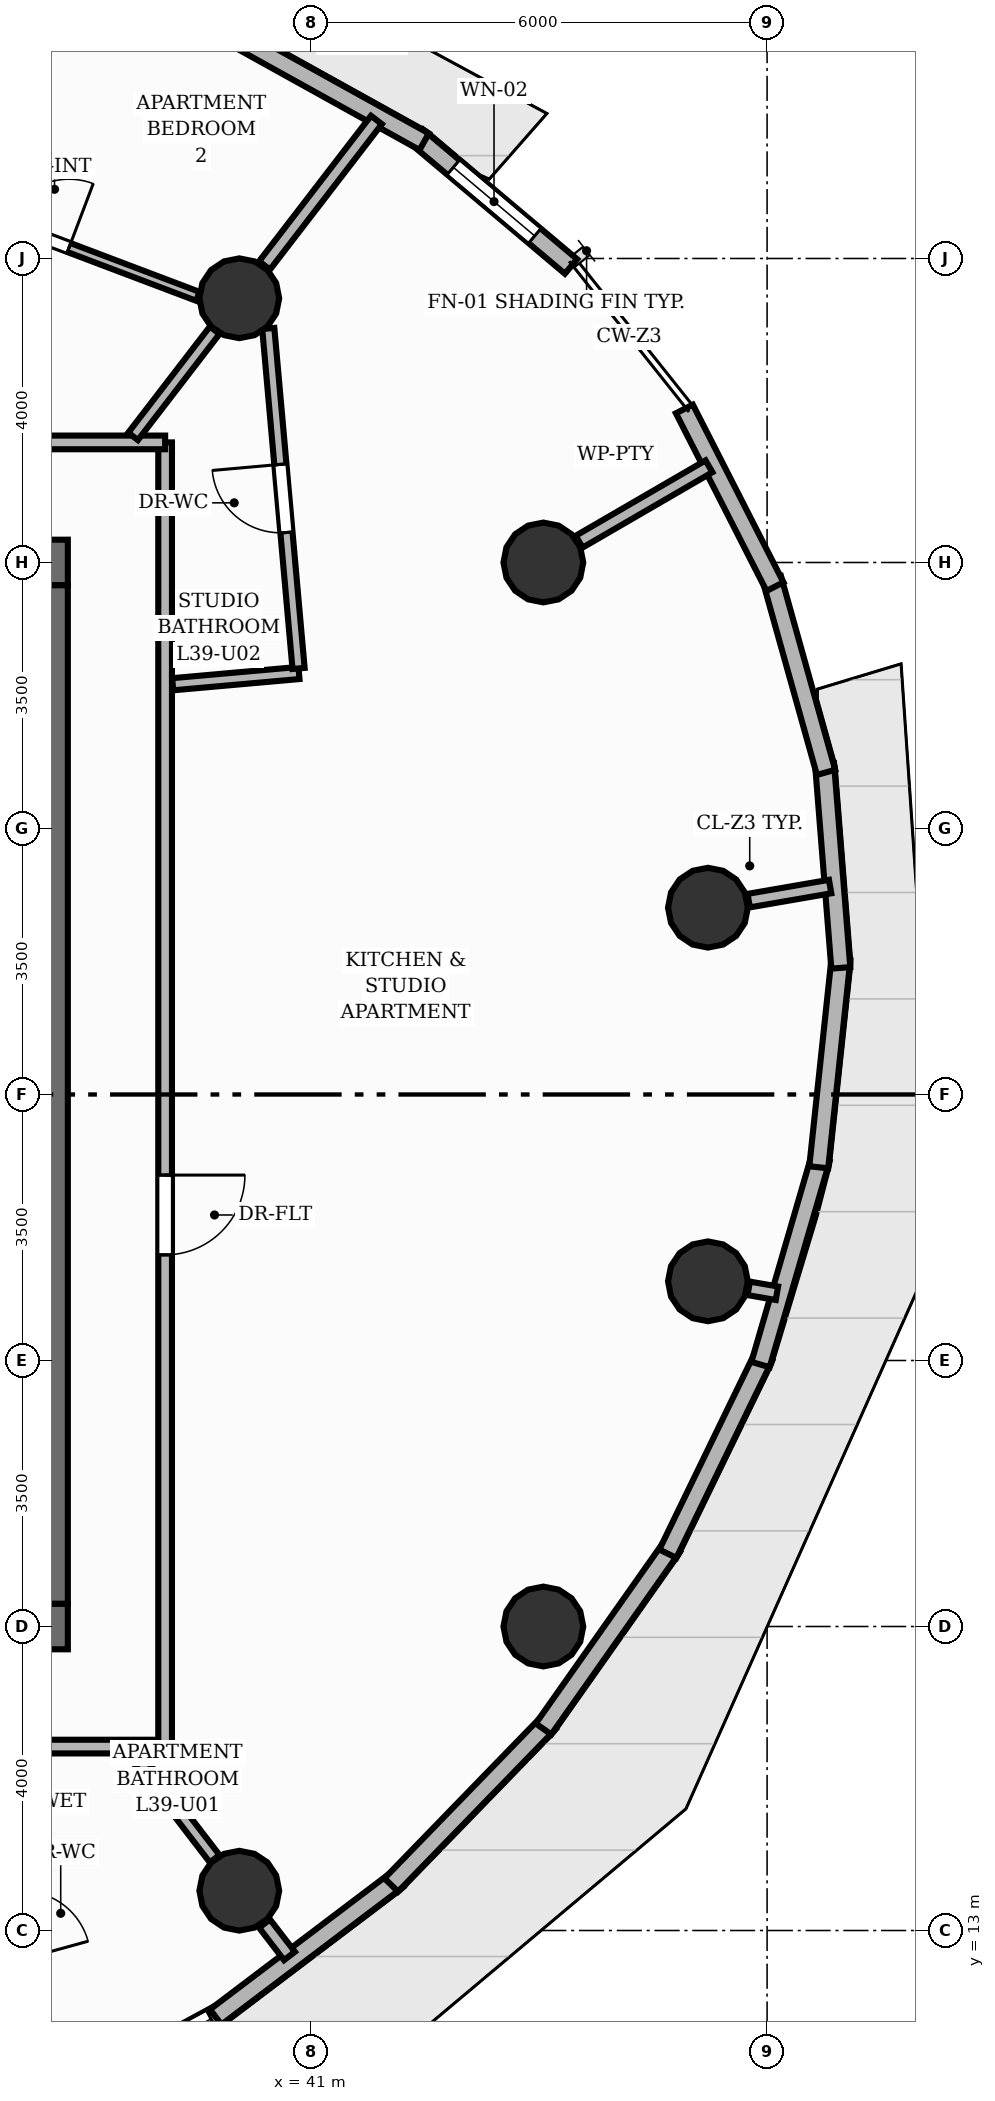
"""IFC4 building model, lengths in metres.
Left out: names, types, materials, properties, quantities, classifications, styles, units other than length and angle.
Written with IfcOpenShell. Run it as: python <this file> out.ifc"""

import sys

from ifc_helpers import new_model, si_unit, direction, frame, frame_2d, origin, origin_2d, place, context, subcontext, project, spatial, rectangle, circle, extrude, element, fill, save


model = new_model("IFC4")
c1 = context("Model", 3, precision=1e-05, world=origin(), true_north=direction((0.0, 1.0)))
c2 = subcontext(c1, "Body", "Model", "MODEL_VIEW")
j1 = project(units=[si_unit("LENGTHUNIT", "METRE"), si_unit("PLANEANGLEUNIT", "RADIAN")], contexts=[c1])
p1 = place(None, origin())
s1 = spatial("IfcSite", under=j1, at=p1, CompositionType="ELEMENT")
p2 = place(p1, origin())
s2 = spatial("IfcBuilding", under=s1, at=p2, CompositionType="ELEMENT")
p3 = place(p2, frame((0.0, 0.0, 132.96)))
s3 = spatial("IfcBuildingStorey", under=s2, at=p3, CompositionType="ELEMENT", Elevation=132.96)
p4 = place(p3, frame((22.7, 17.0, 0.0), z_axis=(0.0, 0.0, 1.0), x_axis=(1.0, 0.0, 0.0)))
e1 = element("IfcWall", 1, at=p4, inside=s3, PredefinedType="SHEAR", context=c2, shape_type="SweptSolid", body=[
    extrude(rectangle(XDim=15.1, YDim=0.6, at=frame_2d((7.55, 0.0))), origin(), (0.0, 0.0, 1.0), 3.2),
])
p5 = place(p4, frame((5.8, 0.0, 0.0)))
e2 = element("IfcOpeningElement", 2, at=p5, cuts=e1, PredefinedType="OPENING", context=c2, shape_type="SweptSolid", body=[
    extrude(rectangle(XDim=1.1, YDim=2.15, at=frame_2d((0.55, 1.075))), frame((0.0, 0.31, 0.0), z_axis=(0.0, -1.0, 0.0), x_axis=(1.0, 0.0, 0.0)), (0.0, 0.0, 1.0), 0.62),
])
p6 = place(p4, frame((9.35, 0.0, 0.0)))
e3 = element("IfcOpeningElement", 3, at=p6, cuts=e1, PredefinedType="OPENING", context=c2, shape_type="SweptSolid", body=[
    extrude(rectangle(XDim=0.9, YDim=2.1, at=frame_2d((0.45, 1.05))), frame((0.0, 0.31, 0.0), z_axis=(0.0, -1.0, 0.0), x_axis=(1.0, 0.0, 0.0)), (0.0, 0.0, 1.0), 0.62),
])
p7 = place(p3, frame((22.7, 31.0, 0.0), z_axis=(0.0, 0.0, 1.0), x_axis=(1.0, 0.0, 0.0)))
e4 = element("IfcWall", 4, at=p7, inside=s3, PredefinedType="SHEAR", context=c2, shape_type="SweptSolid", body=[
    extrude(rectangle(XDim=15.1, YDim=0.6, at=frame_2d((7.55, 0.0))), origin(), (0.0, 0.0, 1.0), 3.2),
])
p8 = place(p7, frame((11.7, 0.0, 0.0)))
e5 = element("IfcOpeningElement", 5, at=p8, cuts=e4, PredefinedType="OPENING", context=c2, shape_type="SweptSolid", body=[
    extrude(rectangle(XDim=1.1, YDim=2.15, at=frame_2d((0.55, 1.075))), frame((0.0, 0.31, 0.0), z_axis=(0.0, -1.0, 0.0), x_axis=(1.0, 0.0, 0.0)), (0.0, 0.0, 1.0), 0.62),
])
p9 = place(p3, frame((37.5, 17.3, 0.0), z_axis=(0.0, 0.0, 1.0), x_axis=(0.0, 1.0, 0.0)))
e6 = element("IfcWall", 6, at=p9, inside=s3, PredefinedType="SHEAR", context=c2, shape_type="SweptSolid", body=[
    extrude(rectangle(XDim=13.4, YDim=0.6, at=frame_2d((6.7, 0.0))), origin(), (0.0, 0.0, 1.0), 3.2),
])
for number, where, z_axis, x_axis in (
    (7, (46.221, 26.458, 0.0), (0.0, 0.0, 1.0), (1.0, 0.0, 0.0)),
    (8, (44.056, 31.0, 0.0), (0.0, 0.0, 1.0), (1.0, 0.0, 0.0)),
    (9, (40.056, 34.477, 0.0), (0.0, 0.0, 1.0), (1.0, 0.0, 0.0)),
    (10, (40.056, 13.523, 0.0), (0.0, 0.0, 1.0), (1.0, 0.0, 0.0)),
    (11, (44.056, 17.0, 0.0), (0.0, 0.0, 1.0), (1.0, 0.0, 0.0)),
    (12, (46.221, 21.542, 0.0), (0.0, 0.0, 1.0), (1.0, 0.0, 0.0)),
):
    element("IfcColumn", number, at=place(p3, frame(where, z_axis=z_axis, x_axis=x_axis)), inside=s3, PredefinedType="COLUMN", context=c2, shape_type="SweptSolid", body=[
        extrude(circle(Radius=0.525, at=origin_2d()), origin(), (0.0, 0.0, 1.0), 3.2),
    ])
p10 = place(p3, frame((42.395, 36.601, 0.0), z_axis=(0.0, 0.0, 1.0), x_axis=(0.764825125467, -0.644237943197, 0.0)))
e13 = element("IfcWall", 13, at=p10, inside=s3, PredefinedType="SOLIDWALL", context=c2, shape_type="SweptSolid", body=[
    extrude(rectangle(XDim=2.648, YDim=0.25, at=frame_2d((1.324, 0.0))), origin(), (0.0, 0.0, 1.0), 2.96),
])
p11 = place(p10, frame((0.624, 0.0, 0.85)))
e14 = element("IfcOpeningElement", 14, at=p11, cuts=e13, PredefinedType="OPENING", context=c2, shape_type="SweptSolid", body=[
    extrude(rectangle(XDim=1.4, YDim=1.55, at=frame_2d((0.7, 0.775))), frame((0.0, 0.135, 0.0), z_axis=(0.0, -1.0, 0.0), x_axis=(1.0, 0.0, 0.0)), (0.0, 0.0, 1.0), 0.27),
])
p12 = place(p3, frame((40.134, 37.844, 0.0), z_axis=(0.0, 0.0, 1.0), x_axis=(0.874341102682, -0.485311895755, 0.0)))
e15 = element("IfcWall", 15, at=p12, inside=s3, PredefinedType="SOLIDWALL", context=c2, shape_type="SweptSolid", body=[
    extrude(rectangle(XDim=2.693, YDim=0.25, at=frame_2d((1.346, 0.0))), origin(), (0.0, 0.0, 1.0), 2.96),
])
p13 = place(p3, frame((39.837, 11.921, 0.0), z_axis=(0.0, 0.0, 1.0), x_axis=(-0.879567466611, -0.475774181393, 0.0)))
e16 = element("IfcWall", 16, at=p13, inside=s3, PredefinedType="SOLIDWALL", context=c2, shape_type="SweptSolid", body=[
    extrude(rectangle(XDim=2.998, YDim=0.25, at=frame_2d((1.499, 0.0))), origin(), (0.0, 0.0, 1.0), 2.96),
])
p14 = place(p13, frame((0.175, 0.0, 0.85)))
e17 = element("IfcOpeningElement", 17, at=p14, cuts=e16, PredefinedType="OPENING", context=c2, shape_type="SweptSolid", body=[
    extrude(rectangle(XDim=1.65, YDim=1.55, at=frame_2d((0.825, 0.775))), frame((0.0, 0.135, 0.0), z_axis=(0.0, -1.0, 0.0), x_axis=(1.0, 0.0, 0.0)), (0.0, 0.0, 1.0), 0.27),
])
p15 = place(p3, frame((42.137, 13.671, 0.0), z_axis=(0.0, 0.0, 1.0), x_axis=(-0.797511213298, -0.603304122863, 0.0)))
e18 = element("IfcWall", 18, at=p15, inside=s3, PredefinedType="SOLIDWALL", context=c2, shape_type="SweptSolid", body=[
    extrude(rectangle(XDim=2.998, YDim=0.25, at=frame_2d((1.499, 0.0))), origin(), (0.0, 0.0, 1.0), 2.96),
])
p16 = place(p3, frame((44.128, 15.736, 0.0), z_axis=(0.0, 0.0, 1.0), x_axis=(-0.696240605886, -0.717808483312, 0.0)))
e19 = element("IfcWall", 19, at=p16, inside=s3, PredefinedType="SOLIDWALL", context=c2, shape_type="SweptSolid", body=[
    extrude(rectangle(XDim=2.977, YDim=0.25, at=frame_2d((1.489, 0.0))), origin(), (0.0, 0.0, 1.0), 2.96),
])
p17 = place(p3, frame((45.75, 18.052, 0.0), z_axis=(0.0, 0.0, 1.0), x_axis=(-0.576020449187, -0.817435283137, 0.0)))
e20 = element("IfcWall", 20, at=p17, inside=s3, PredefinedType="SOLIDWALL", context=c2, shape_type="SweptSolid", body=[
    extrude(rectangle(XDim=2.937, YDim=0.25, at=frame_2d((1.468, 0.0))), origin(), (0.0, 0.0, 1.0), 2.96),
])
p18 = place(p3, frame((46.953, 20.55, 0.0), z_axis=(0.0, 0.0, 1.0), x_axis=(-0.436882419805, -0.899518621967, 0.0)))
e21 = element("IfcWall", 21, at=p18, inside=s3, PredefinedType="SOLIDWALL", context=c2, shape_type="SweptSolid", body=[
    extrude(rectangle(XDim=2.882, YDim=0.25, at=frame_2d((1.441, 0.0))), origin(), (0.0, 0.0, 1.0), 2.96),
])
p19 = place(p3, frame((47.701, 23.152, 0.0), z_axis=(0.0, 0.0, 1.0), x_axis=(-0.27958078407, -0.960122172007, 0.0)))
e22 = element("IfcWall", 22, at=p19, inside=s3, PredefinedType="SOLIDWALL", context=c2, shape_type="SweptSolid", body=[
    extrude(rectangle(XDim=2.818, YDim=0.25, at=frame_2d((1.409, 0.0))), origin(), (0.0, 0.0, 1.0), 2.96),
])
p20 = place(p3, frame((47.971, 25.779, 0.0), z_axis=(0.0, 0.0, 1.0), x_axis=(-0.106010014212, -0.994365062181, 0.0)))
e23 = element("IfcWall", 23, at=p20, inside=s3, PredefinedType="SOLIDWALL", context=c2, shape_type="SweptSolid", body=[
    extrude(rectangle(XDim=2.752, YDim=0.25, at=frame_2d((1.376, 0.0))), origin(), (0.0, 0.0, 1.0), 2.96),
])
p21 = place(p3, frame((47.756, 28.35, 0.0), z_axis=(0.0, 0.0, 1.0), x_axis=(0.079420906371, -0.996841170714, 0.0)))
e24 = element("IfcWall", 24, at=p21, inside=s3, PredefinedType="SOLIDWALL", context=c2, shape_type="SweptSolid", body=[
    extrude(rectangle(XDim=2.693, YDim=0.25, at=frame_2d((1.346, 0.0))), origin(), (0.0, 0.0, 1.0), 2.96),
])
p22 = place(p3, frame((47.062, 30.789, 0.0), z_axis=(0.0, 0.0, 1.0), x_axis=(0.269469206067, -0.963009006698, 0.0)))
e25 = element("IfcWall", 25, at=p22, inside=s3, PredefinedType="SOLIDWALL", context=c2, shape_type="SweptSolid", body=[
    extrude(rectangle(XDim=2.648, YDim=0.25, at=frame_2d((1.324, 0.0))), origin(), (0.0, 0.0, 1.0), 2.96),
])
p23 = place(p3, frame((45.912, 33.02, 0.0), z_axis=(0.0, 0.0, 1.0), x_axis=(0.454196134835, -0.890901717981, 0.0)))
e26 = element("IfcWall", 26, at=p23, inside=s3, PredefinedType="SOLIDWALL", context=c2, shape_type="SweptSolid", body=[
    extrude(rectangle(XDim=2.624, YDim=0.25, at=frame_2d((1.312, 0.0))), origin(), (0.0, 0.0, 1.0), 2.96),
])
p24 = place(p3, frame((46.758, 26.551, 0.0), z_axis=(0.0, 0.0, 1.0), x_axis=(0.985361391556, 0.170478526599, 0.0)))
e27 = element("IfcWall", 27, at=p24, inside=s3, PredefinedType="PARTITIONING", context=c2, shape_type="SweptSolid", body=[
    extrude(rectangle(XDim=1.087, YDim=0.18, at=frame_2d((0.543, 0.0))), origin(), (0.0, 0.0, 1.0), 2.336),
])
p25 = place(p3, frame((44.528, 31.274, 0.0), z_axis=(0.0, 0.0, 1.0), x_axis=(0.864844369658, 0.502040054448, 0.0)))
e28 = element("IfcWall", 28, at=p25, inside=s3, PredefinedType="PARTITIONING", context=c2, shape_type="SweptSolid", body=[
    extrude(rectangle(XDim=1.974, YDim=0.18, at=frame_2d((0.987, 0.0))), origin(), (0.0, 0.0, 1.0), 2.336),
])
p26 = place(p3, frame((40.388, 34.908, 0.0), z_axis=(0.0, 0.0, 1.0), x_axis=(0.609549509747, 0.79274800231, 0.0)))
e29 = element("IfcWall", 29, at=p26, inside=s3, PredefinedType="PARTITIONING", context=c2, shape_type="SweptSolid", body=[
    extrude(rectangle(XDim=2.415, YDim=0.18, at=frame_2d((1.208, 0.0))), origin(), (0.0, 0.0, 1.0), 2.336),
])
p27 = place(p3, frame((40.388, 13.092, 0.0), z_axis=(0.0, 0.0, 1.0), x_axis=(0.609469486836, -0.792809526063, 0.0)))
e30 = element("IfcWall", 30, at=p27, inside=s3, PredefinedType="PARTITIONING", context=c2, shape_type="SweptSolid", body=[
    extrude(rectangle(XDim=0.538, YDim=0.18, at=frame_2d((0.269, 0.0))), origin(), (0.0, 0.0, 1.0), 2.336),
])
p28 = place(p3, frame((46.758, 21.449, 0.0), z_axis=(0.0, 0.0, 1.0), x_axis=(0.98535888436, -0.170493017491, 0.0)))
e31 = element("IfcWall", 31, at=p28, inside=s3, PredefinedType="PARTITIONING", context=c2, shape_type="SweptSolid", body=[
    extrude(rectangle(XDim=0.377, YDim=0.18, at=frame_2d((0.188, 0.0))), origin(), (0.0, 0.0, 1.0), 2.336),
])
p29 = place(p3, frame((39.08, 15.42, 0.0), z_axis=(0.0, 0.0, 1.0), x_axis=(-1.0, 0.0, 0.0)))
e32 = element("IfcWall", 32, at=p29, inside=s3, PredefinedType="PARTITIONING", context=c2, shape_type="SweptSolid", body=[
    extrude(rectangle(XDim=16.39, YDim=0.18, at=frame_2d((8.195, 0.0))), origin(), (0.0, 0.0, 1.0), 2.955),
])
p30 = place(p29, frame((4.593, 0.0, 0.0)))
e33 = element("IfcOpeningElement", 33, at=p30, cuts=e32, PredefinedType="OPENING", context=c2, shape_type="SweptSolid", body=[
    extrude(rectangle(XDim=1.05, YDim=2.15, at=frame_2d((0.525, 1.075))), frame((0.0, 0.1, 0.0), z_axis=(0.0, -1.0, 0.0), x_axis=(1.0, 0.0, 0.0)), (0.0, 0.0, 1.0), 0.2),
])
p31 = place(p3, frame((39.08, 32.58, 0.0), z_axis=(0.0, 0.0, 1.0), x_axis=(0.0, -1.0, 0.0)))
e34 = element("IfcWall", 34, at=p31, inside=s3, PredefinedType="PARTITIONING", context=c2, shape_type="SweptSolid", body=[
    extrude(rectangle(XDim=17.16, YDim=0.18, at=frame_2d((8.58, 0.0))), origin(), (0.0, 0.0, 1.0), 2.955),
])
p32 = place(p31, frame((9.64, 0.0, 0.0)))
e35 = element("IfcOpeningElement", 35, at=p32, cuts=e34, PredefinedType="OPENING", context=c2, shape_type="SweptSolid", body=[
    extrude(rectangle(XDim=1.05, YDim=2.15, at=frame_2d((0.525, 1.075))), frame((0.0, 0.1, 0.0), z_axis=(0.0, -1.0, 0.0), x_axis=(1.0, 0.0, 0.0)), (0.0, 0.0, 1.0), 0.2),
])
p33 = place(p3, frame((32.485, 32.58, 0.0), z_axis=(0.0, 0.0, 1.0), x_axis=(1.0, 0.0, 0.0)))
e36 = element("IfcWall", 36, at=p33, inside=s3, PredefinedType="PARTITIONING", context=c2, shape_type="SweptSolid", body=[
    extrude(rectangle(XDim=6.595, YDim=0.18, at=frame_2d((3.298, 0.0))), origin(), (0.0, 0.0, 1.0), 2.955),
])
p34 = place(p3, frame((36.455, 15.323, 0.0), z_axis=(0.0, 0.0, 1.0), x_axis=(0.265393905211, -0.964140070258, 0.0)))
e37 = element("IfcWall", 37, at=p34, inside=s3, PredefinedType="PLUMBINGWALL", context=c2, shape_type="SweptSolid", body=[
    extrude(rectangle(XDim=4.708, YDim=0.16, at=frame_2d((2.354, 0.0))), origin(), (0.0, 0.0, 1.0), 2.955),
])
p35 = place(p34, frame((1.904, 0.0, 0.0)))
e38 = element("IfcOpeningElement", 38, at=p35, cuts=e37, PredefinedType="OPENING", context=c2, shape_type="SweptSolid", body=[
    extrude(rectangle(XDim=0.9, YDim=2.1, at=frame_2d((0.45, 1.05))), frame((0.0, 0.09, 0.0), z_axis=(0.0, -1.0, 0.0), x_axis=(1.0, 0.0, 0.0)), (0.0, 0.0, 1.0), 0.18),
])
p36 = place(p3, frame((38.658, 15.341, 0.0), z_axis=(0.0, 0.0, 1.0), x_axis=(0.609536601946, -0.792757927042, 0.0)))
e39 = element("IfcWall", 39, at=p36, inside=s3, PredefinedType="PLUMBINGWALL", context=c2, shape_type="SweptSolid", body=[
    extrude(rectangle(XDim=1.761, YDim=0.16, at=frame_2d((0.881, 0.0))), origin(), (0.0, 0.0, 1.0), 2.336),
])
p37 = place(p3, frame((39.18, 29.398, 0.0), z_axis=(0.0, 0.0, 1.0), x_axis=(0.996058284503, 0.088701149215, 0.0)))
e40 = element("IfcWall", 40, at=p37, inside=s3, PredefinedType="PLUMBINGWALL", context=c2, shape_type="SweptSolid", body=[
    extrude(rectangle(XDim=1.668, YDim=0.16, at=frame_2d((0.834, 0.0))), origin(), (0.0, 0.0, 1.0), 2.955),
])
p38 = place(p3, frame((40.836, 29.606, 0.0), z_axis=(0.0, 0.0, 1.0), x_axis=(-0.08877110741, 0.996052052098, 0.0)))
e41 = element("IfcWall", 41, at=p38, inside=s3, PredefinedType="PLUMBINGWALL", context=c2, shape_type="SweptSolid", body=[
    extrude(rectangle(XDim=4.491, YDim=0.16, at=frame_2d((2.246, 0.0))), origin(), (0.0, 0.0, 1.0), 2.955),
])
p39 = place(p38, frame((1.796, 0.0, 0.0)))
e42 = element("IfcOpeningElement", 42, at=p39, cuts=e41, PredefinedType="OPENING", context=c2, shape_type="SweptSolid", body=[
    extrude(rectangle(XDim=0.9, YDim=2.1, at=frame_2d((0.45, 1.05))), frame((0.0, 0.09, 0.0), z_axis=(0.0, -1.0, 0.0), x_axis=(1.0, 0.0, 0.0)), (0.0, 0.0, 1.0), 0.18),
])
p40 = place(p3, frame((38.658, 32.659, 0.0), z_axis=(0.0, 0.0, 1.0), x_axis=(0.609536601946, 0.792757927042, 0.0)))
e43 = element("IfcWall", 43, at=p40, inside=s3, PredefinedType="PLUMBINGWALL", context=c2, shape_type="SweptSolid", body=[
    extrude(rectangle(XDim=1.761, YDim=0.16, at=frame_2d((0.881, 0.0))), origin(), (0.0, 0.0, 1.0), 2.336),
])
p41 = place(p3, frame((35.278, 36.103, 0.0), z_axis=(0.0, 0.0, 1.0), x_axis=(0.935309901838, -0.353829602385, 0.0)))
e44 = element("IfcWall", 44, at=p41, inside=s3, PredefinedType="PARTITIONING", context=c2, shape_type="SweptSolid", body=[
    extrude(rectangle(XDim=4.526, YDim=0.125, at=frame_2d((2.263, 0.0))), origin(), (0.0, 0.0, 1.0), 2.411),
])
p42 = place(p41, frame((1.813, 0.0, 0.0)))
e45 = element("IfcOpeningElement", 45, at=p42, cuts=e44, PredefinedType="OPENING", context=c2, shape_type="SweptSolid", body=[
    extrude(rectangle(XDim=0.9, YDim=2.1, at=frame_2d((0.45, 1.05))), frame((0.0, 0.073, 0.0), z_axis=(0.0, -1.0, 0.0), x_axis=(1.0, 0.0, 0.0)), (0.0, 0.0, 1.0), 0.145),
])
p43 = place(p11, origin())
e46 = element("IfcWindow", 46, at=p43, inside=s3, PartitioningType="SINGLE_PANEL", PredefinedType="WINDOW", context=c2, shape_type="SweptSolid", body=[
    extrude(rectangle(XDim=1.4, YDim=1.55, at=frame_2d((0.7, 0.775))), frame((0.0, 0.03, 0.0), z_axis=(0.0, -1.0, 0.0), x_axis=(1.0, 0.0, 0.0)), (0.0, 0.0, 1.0), 0.06),
])
fill(e14, e46)
p44 = place(p14, origin())
e47 = element("IfcWindow", 47, at=p44, inside=s3, PartitioningType="SINGLE_PANEL", PredefinedType="WINDOW", context=c2, shape_type="SweptSolid", body=[
    extrude(rectangle(XDim=1.65, YDim=1.55, at=frame_2d((0.825, 0.775))), frame((0.0, 0.03, 0.0), z_axis=(0.0, -1.0, 0.0), x_axis=(1.0, 0.0, 0.0)), (0.0, 0.0, 1.0), 0.06),
])
fill(e17, e47)
p45 = place(p32, origin())
e48 = element("IfcDoor", 48, at=p45, inside=s3, OperationType="SINGLE_SWING_LEFT", PredefinedType="DOOR", context=c2, shape_type="SweptSolid", body=[
    extrude(rectangle(XDim=1.05, YDim=2.15, at=frame_2d((0.525, 1.075))), frame((0.0, 0.025, 0.0), z_axis=(0.0, -1.0, 0.0), x_axis=(1.0, 0.0, 0.0)), (0.0, 0.0, 1.0), 0.05),
])
fill(e35, e48)
p46 = place(p39, origin())
e49 = element("IfcDoor", 49, at=p46, inside=s3, OperationType="SINGLE_SWING_RIGHT", PredefinedType="DOOR", context=c2, shape_type="SweptSolid", body=[
    extrude(rectangle(XDim=0.9, YDim=2.1, at=frame_2d((0.45, 1.05))), frame((0.0, 0.025, 0.0), z_axis=(0.0, -1.0, 0.0), x_axis=(1.0, 0.0, 0.0)), (0.0, 0.0, 1.0), 0.05),
])
fill(e42, e49)
p47 = place(p42, origin())
e50 = element("IfcDoor", 50, at=p47, inside=s3, OperationType="SINGLE_SWING_RIGHT", PredefinedType="DOOR", context=c2, shape_type="SweptSolid", body=[
    extrude(rectangle(XDim=0.9, YDim=2.1, at=frame_2d((0.45, 1.05))), frame((0.0, 0.025, 0.0), z_axis=(0.0, -1.0, 0.0), x_axis=(1.0, 0.0, 0.0)), (0.0, 0.0, 1.0), 0.05),
])
fill(e45, e50)
save(model, sys.argv[1])
